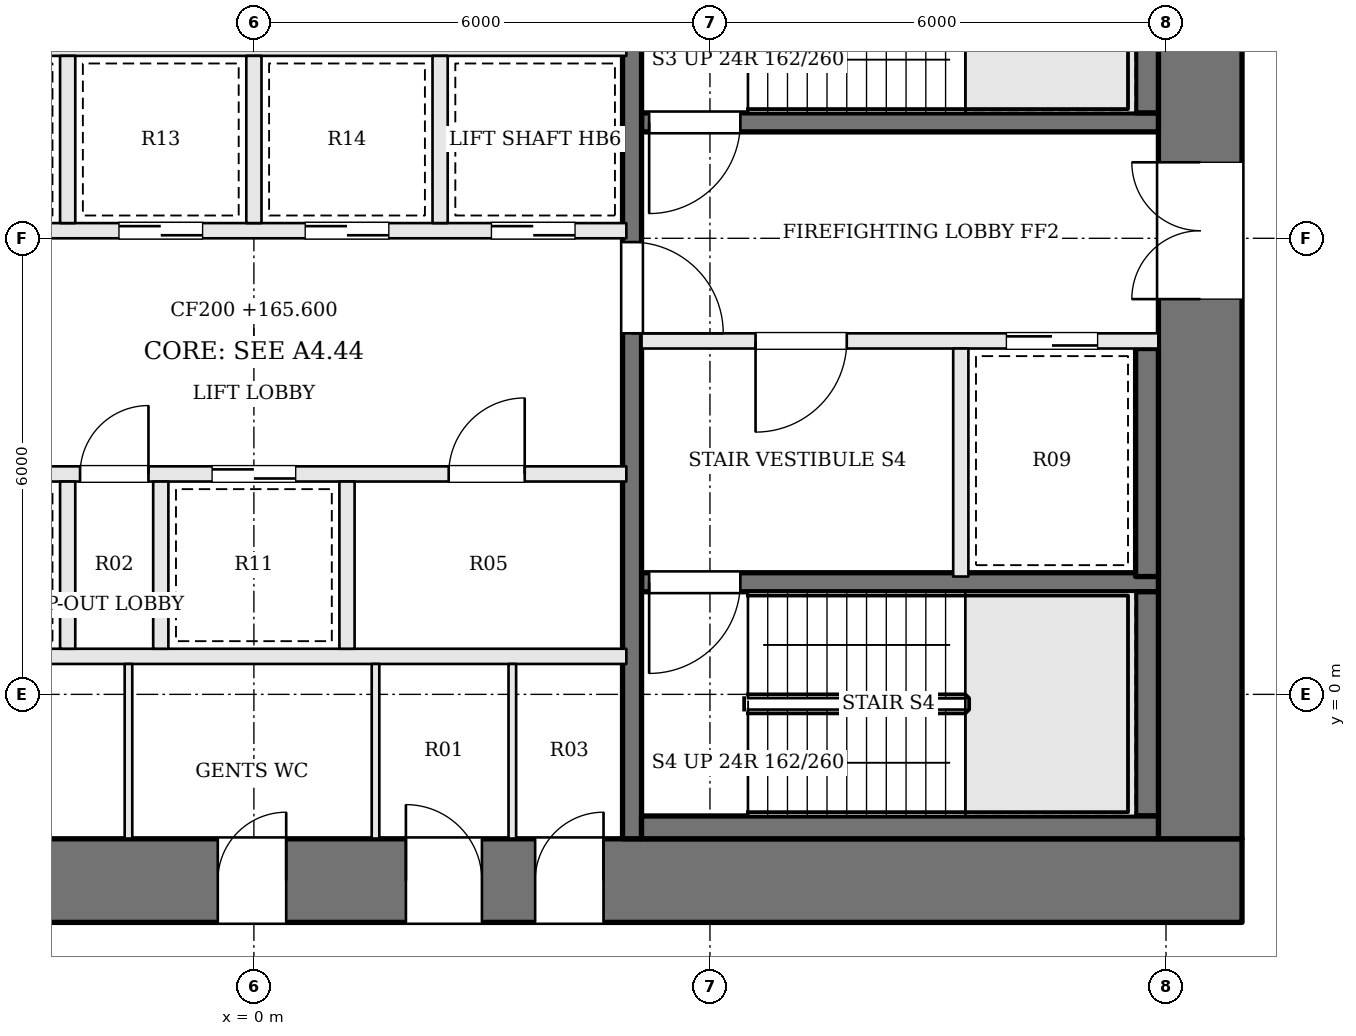
"""IFC4 building model, lengths in metres.
Left out: names, types, materials, properties, quantities, classifications, styles, units other than length and angle.
Written with IfcOpenShell. Run it as: python <this file> out.ifc"""

import sys

from ifc_helpers import new_model, si_unit, direction, frame, frame_2d, origin, place, context, subcontext, project, spatial, rectangle, extrude, element, fill, save


model = new_model("IFC4")
c1 = context("Model", 3, precision=1e-05, world=origin(), true_north=direction((0.0, 1.0)))
c2 = subcontext(c1, "Body", "Model", "MODEL_VIEW")
j1 = project(units=[si_unit("LENGTHUNIT", "METRE"), si_unit("PLANEANGLEUNIT", "RADIAN")], contexts=[c1])
p1 = place(None, origin())
s1 = spatial("IfcSite", under=j1, at=p1, CompositionType="ELEMENT")
p2 = place(p1, origin())
s2 = spatial("IfcBuilding", under=s1, at=p2, CompositionType="ELEMENT")
p3 = place(p2, frame((0.0, 0.0, 165.6)))
s3 = spatial("IfcBuildingStorey", under=s2, at=p3, CompositionType="ELEMENT", Elevation=165.6)
p4 = place(p3, frame((-13.0, -2.45, 0.0), z_axis=(0.0, 0.0, 1.0), x_axis=(1.0, 0.0, 0.0)))
e1 = element("IfcWall", 1, at=p4, inside=s3, PredefinedType="SHEAR", context=c2, shape_type="SweptSolid", body=[
    extrude(rectangle(XDim=26.0, YDim=1.1, at=frame_2d((13.0, 0.0))), origin(), (0.0, 0.0, 1.0), 3.9),
])
p5 = place(p4, frame((9.275, 0.0, 0.0)))
e2 = element("IfcOpeningElement", 2, at=p5, cuts=e1, PredefinedType="OPENING", context=c2, shape_type="SweptSolid", body=[
    extrude(rectangle(XDim=0.9, YDim=2.1, at=frame_2d((0.45, 1.05))), frame((0.0, 0.56, 0.0), z_axis=(0.0, -1.0, 0.0), x_axis=(1.0, 0.0, 0.0)), (0.0, 0.0, 1.0), 1.12),
])
p6 = place(p4, frame((12.525, 0.0, 0.0)))
e3 = element("IfcOpeningElement", 3, at=p6, cuts=e1, PredefinedType="OPENING", context=c2, shape_type="SweptSolid", body=[
    extrude(rectangle(XDim=0.9, YDim=2.1, at=frame_2d((0.45, 1.05))), frame((0.0, 0.56, 0.0), z_axis=(0.0, -1.0, 0.0), x_axis=(1.0, 0.0, 0.0)), (0.0, 0.0, 1.0), 1.12),
])
p7 = place(p4, frame((15.0, 0.0, 0.0)))
e4 = element("IfcOpeningElement", 4, at=p7, cuts=e1, PredefinedType="OPENING", context=c2, shape_type="SweptSolid", body=[
    extrude(rectangle(XDim=1.0, YDim=2.1, at=frame_2d((0.5, 1.05))), frame((0.0, 0.56, 0.0), z_axis=(0.0, -1.0, 0.0), x_axis=(1.0, 0.0, 0.0)), (0.0, 0.0, 1.0), 1.12),
])
p8 = place(p4, frame((16.7, 0.0, 0.0)))
e5 = element("IfcOpeningElement", 5, at=p8, cuts=e1, PredefinedType="OPENING", context=c2, shape_type="SweptSolid", body=[
    extrude(rectangle(XDim=0.9, YDim=2.1, at=frame_2d((0.45, 1.05))), frame((0.0, 0.56, 0.0), z_axis=(0.0, -1.0, 0.0), x_axis=(1.0, 0.0, 0.0)), (0.0, 0.0, 1.0), 1.12),
])
p9 = place(p3, frame((12.45, -1.9, 0.0), z_axis=(0.0, 0.0, 1.0), x_axis=(0.0, 1.0, 0.0)))
e6 = element("IfcWall", 6, at=p9, inside=s3, PredefinedType="SHEAR", context=c2, shape_type="SweptSolid", body=[
    extrude(rectangle(XDim=12.8, YDim=1.1, at=frame_2d((6.4, 0.0))), origin(), (0.0, 0.0, 1.0), 3.9),
])
p10 = place(p9, frame((7.1, 0.0, 0.0)))
e7 = element("IfcOpeningElement", 7, at=p10, cuts=e6, PredefinedType="OPENING", context=c2, shape_type="SweptSolid", body=[
    extrude(rectangle(XDim=1.8, YDim=2.1, at=frame_2d((0.9, 1.05))), frame((0.0, 0.56, 0.0), z_axis=(0.0, -1.0, 0.0), x_axis=(1.0, 0.0, 0.0)), (0.0, 0.0, 1.0), 1.12),
])
p11 = place(p3, frame((11.9, 7.525, 0.0), z_axis=(0.0, 0.0, 1.0), x_axis=(-1.0, 0.0, 0.0)))
e8 = element("IfcWall", 8, at=p11, inside=s3, PredefinedType="SOLIDWALL", context=c2, shape_type="SweptSolid", body=[
    extrude(rectangle(XDim=6.8, YDim=0.25, at=frame_2d((3.4, 0.0))), origin(), (0.0, 0.0, 1.0), 3.6),
])
p12 = place(p11, frame((5.5, 0.0, 0.0)))
e9 = element("IfcOpeningElement", 9, at=p12, cuts=e8, PredefinedType="OPENING", context=c2, shape_type="SweptSolid", body=[
    extrude(rectangle(XDim=1.2, YDim=2.1, at=frame_2d((0.6, 1.05))), frame((0.0, 0.135, 0.0), z_axis=(0.0, -1.0, 0.0), x_axis=(1.0, 0.0, 0.0)), (0.0, 0.0, 1.0), 0.27),
])
p13 = place(p3, frame((11.9, 4.65, 0.0), z_axis=(0.0, 0.0, 1.0), x_axis=(-1.0, 0.0, 0.0)))
e10 = element("IfcWall", 10, at=p13, inside=s3, PredefinedType="SOLIDWALL", context=c2, shape_type="SweptSolid", body=[
    extrude(rectangle(XDim=6.8, YDim=0.2, at=frame_2d((3.4, 0.0))), origin(), (0.0, 0.0, 1.0), 3.6),
])
p14 = place(p13, frame((4.1, 0.0, 0.0)))
e11 = element("IfcOpeningElement", 11, at=p14, cuts=e10, PredefinedType="OPENING", context=c2, shape_type="SweptSolid", body=[
    extrude(rectangle(XDim=1.2, YDim=2.1, at=frame_2d((0.6, 1.05))), frame((0.0, 0.11, 0.0), z_axis=(0.0, -1.0, 0.0), x_axis=(1.0, 0.0, 0.0)), (0.0, 0.0, 1.0), 0.22),
])
p15 = place(p13, frame((0.8, 0.0, 0.0)))
e12 = element("IfcOpeningElement", 12, at=p15, cuts=e10, PredefinedType="OPENING", context=c2, shape_type="SweptSolid", body=[
    extrude(rectangle(XDim=1.2, YDim=2.1, at=frame_2d((0.6, 1.05))), frame((0.0, 0.11, 0.0), z_axis=(0.0, -1.0, 0.0), x_axis=(1.0, 0.0, 0.0)), (0.0, 0.0, 1.0), 0.22),
])
p16 = place(p3, frame((11.9, 1.475, 0.0), z_axis=(0.0, 0.0, 1.0), x_axis=(-1.0, 0.0, 0.0)))
e13 = element("IfcWall", 13, at=p16, inside=s3, PredefinedType="SOLIDWALL", context=c2, shape_type="SweptSolid", body=[
    extrude(rectangle(XDim=6.8, YDim=0.25, at=frame_2d((3.4, 0.0))), origin(), (0.0, 0.0, 1.0), 3.6),
])
p17 = place(p16, frame((5.5, 0.0, 0.0)))
e14 = element("IfcOpeningElement", 14, at=p17, cuts=e13, PredefinedType="OPENING", context=c2, shape_type="SweptSolid", body=[
    extrude(rectangle(XDim=1.2, YDim=2.1, at=frame_2d((0.6, 1.05))), frame((0.0, 0.135, 0.0), z_axis=(0.0, -1.0, 0.0), x_axis=(1.0, 0.0, 0.0)), (0.0, 0.0, 1.0), 0.27),
])
p18 = place(p3, frame((9.3, 4.55, 0.0), z_axis=(0.0, 0.0, 1.0), x_axis=(0.0, -1.0, 0.0)))
e15 = element("IfcWall", 15, at=p18, inside=s3, PredefinedType="SOLIDWALL", context=c2, shape_type="SweptSolid", body=[
    extrude(rectangle(XDim=3.0, YDim=0.2, at=frame_2d((1.5, 0.0))), origin(), (0.0, 0.0, 1.0), 3.6),
])
p19 = place(p3, frame((4.975, 10.9, 0.0), z_axis=(0.0, 0.0, 1.0), x_axis=(0.0, -1.0, 0.0)))
e16 = element("IfcWall", 16, at=p19, inside=s3, PredefinedType="SOLIDWALL", context=c2, shape_type="SweptSolid", body=[
    extrude(rectangle(XDim=12.8, YDim=0.25, at=frame_2d((6.4, 0.0))), origin(), (0.0, 0.0, 1.0), 3.6),
])
p20 = place(p19, frame((4.95, 0.0, 0.0)))
e17 = element("IfcOpeningElement", 17, at=p20, cuts=e16, PredefinedType="OPENING", context=c2, shape_type="SweptSolid", body=[
    extrude(rectangle(XDim=1.2, YDim=2.1, at=frame_2d((0.6, 1.05))), frame((0.0, 0.135, 0.0), z_axis=(0.0, -1.0, 0.0), x_axis=(1.0, 0.0, 0.0)), (0.0, 0.0, 1.0), 0.27),
])
p21 = place(p3, frame((11.75, 10.6, 0.0), z_axis=(0.0, 0.0, 1.0), x_axis=(0.0, -1.0, 0.0)))
e18 = element("IfcWall", 18, at=p21, inside=s3, PredefinedType="SOLIDWALL", context=c2, shape_type="SweptSolid", body=[
    extrude(rectangle(XDim=2.95, YDim=0.3, at=frame_2d((1.475, 0.0))), origin(), (0.0, 0.0, 1.0), 3.6),
])
p22 = place(p3, frame((11.75, 4.55, 0.0), z_axis=(0.0, 0.0, 1.0), x_axis=(0.0, -1.0, 0.0)))
e19 = element("IfcWall", 19, at=p22, inside=s3, PredefinedType="SOLIDWALL", context=c2, shape_type="SweptSolid", body=[
    extrude(rectangle(XDim=3.0, YDim=0.3, at=frame_2d((1.5, 0.0))), origin(), (0.0, 0.0, 1.0), 3.6),
])
p23 = place(p3, frame((11.75, 1.35, 0.0), z_axis=(0.0, 0.0, 1.0), x_axis=(0.0, -1.0, 0.0)))
e20 = element("IfcWall", 20, at=p23, inside=s3, PredefinedType="SOLIDWALL", context=c2, shape_type="SweptSolid", body=[
    extrude(rectangle(XDim=2.95, YDim=0.3, at=frame_2d((1.475, 0.0))), origin(), (0.0, 0.0, 1.0), 3.6),
])
p24 = place(p3, frame((11.9, -1.75, 0.0), z_axis=(0.0, 0.0, 1.0), x_axis=(-1.0, 0.0, 0.0)))
e21 = element("IfcWall", 21, at=p24, inside=s3, PredefinedType="SOLIDWALL", context=c2, shape_type="SweptSolid", body=[
    extrude(rectangle(XDim=6.8, YDim=0.3, at=frame_2d((3.4, 0.0))), origin(), (0.0, 0.0, 1.0), 3.6),
])
p25 = place(p3, frame((-4.9, 0.5, 0.0), z_axis=(0.0, 0.0, 1.0), x_axis=(1.0, 0.0, 0.0)))
e22 = element("IfcWall", 22, at=p25, inside=s3, PredefinedType="SOLIDWALL", context=c2, shape_type="SweptSolid", body=[
    extrude(rectangle(XDim=9.8, YDim=0.2, at=frame_2d((4.9, 0.0))), origin(), (0.0, 0.0, 1.0), 3.6),
])
p26 = place(p3, frame((-4.9, 2.9, 0.0), z_axis=(0.0, 0.0, 1.0), x_axis=(1.0, 0.0, 0.0)))
e23 = element("IfcWall", 23, at=p26, inside=s3, PredefinedType="SOLIDWALL", context=c2, shape_type="SweptSolid", body=[
    extrude(rectangle(XDim=9.8, YDim=0.2, at=frame_2d((4.9, 0.0))), origin(), (0.0, 0.0, 1.0), 3.6),
])
p27 = place(p26, frame((0.675, 0.0, 0.0)))
e24 = element("IfcOpeningElement", 24, at=p27, cuts=e23, PredefinedType="OPENING", context=c2, shape_type="SweptSolid", body=[
    extrude(rectangle(XDim=1.1, YDim=2.1, at=frame_2d((0.55, 1.05))), frame((0.0, 0.11, 0.0), z_axis=(0.0, -1.0, 0.0), x_axis=(1.0, 0.0, 0.0)), (0.0, 0.0, 1.0), 0.22),
])
p28 = place(p26, frame((2.613, 0.0, 0.0)))
e25 = element("IfcOpeningElement", 25, at=p28, cuts=e23, PredefinedType="OPENING", context=c2, shape_type="SweptSolid", body=[
    extrude(rectangle(XDim=0.9, YDim=2.1, at=frame_2d((0.45, 1.05))), frame((0.0, 0.11, 0.0), z_axis=(0.0, -1.0, 0.0), x_axis=(1.0, 0.0, 0.0)), (0.0, 0.0, 1.0), 0.22),
])
p29 = place(p26, frame((4.35, 0.0, 0.0)))
e26 = element("IfcOpeningElement", 26, at=p29, cuts=e23, PredefinedType="OPENING", context=c2, shape_type="SweptSolid", body=[
    extrude(rectangle(XDim=1.1, YDim=2.1, at=frame_2d((0.55, 1.05))), frame((0.0, 0.11, 0.0), z_axis=(0.0, -1.0, 0.0), x_axis=(1.0, 0.0, 0.0)), (0.0, 0.0, 1.0), 0.22),
])
p30 = place(p26, frame((7.463, 0.0, 0.0)))
e27 = element("IfcOpeningElement", 27, at=p30, cuts=e23, PredefinedType="OPENING", context=c2, shape_type="SweptSolid", body=[
    extrude(rectangle(XDim=1.0, YDim=2.1, at=frame_2d((0.5, 1.05))), frame((0.0, 0.11, 0.0), z_axis=(0.0, -1.0, 0.0), x_axis=(1.0, 0.0, 0.0)), (0.0, 0.0, 1.0), 0.22),
])
p31 = place(p3, frame((-4.9, 6.1, 0.0), z_axis=(0.0, 0.0, 1.0), x_axis=(1.0, 0.0, 0.0)))
e28 = element("IfcWall", 28, at=p31, inside=s3, PredefinedType="SOLIDWALL", context=c2, shape_type="SweptSolid", body=[
    extrude(rectangle(XDim=9.8, YDim=0.2, at=frame_2d((4.9, 0.0))), origin(), (0.0, 0.0, 1.0), 3.6),
])
p32 = place(p31, frame((0.675, 0.0, 0.0)))
e29 = element("IfcOpeningElement", 29, at=p32, cuts=e28, PredefinedType="OPENING", context=c2, shape_type="SweptSolid", body=[
    extrude(rectangle(XDim=1.1, YDim=2.1, at=frame_2d((0.55, 1.05))), frame((0.0, 0.11, 0.0), z_axis=(0.0, -1.0, 0.0), x_axis=(1.0, 0.0, 0.0)), (0.0, 0.0, 1.0), 0.22),
])
p33 = place(p31, frame((3.125, 0.0, 0.0)))
e30 = element("IfcOpeningElement", 30, at=p33, cuts=e28, PredefinedType="OPENING", context=c2, shape_type="SweptSolid", body=[
    extrude(rectangle(XDim=1.1, YDim=2.1, at=frame_2d((0.55, 1.05))), frame((0.0, 0.11, 0.0), z_axis=(0.0, -1.0, 0.0), x_axis=(1.0, 0.0, 0.0)), (0.0, 0.0, 1.0), 0.22),
])
p34 = place(p31, frame((5.575, 0.0, 0.0)))
e31 = element("IfcOpeningElement", 31, at=p34, cuts=e28, PredefinedType="OPENING", context=c2, shape_type="SweptSolid", body=[
    extrude(rectangle(XDim=1.1, YDim=2.1, at=frame_2d((0.55, 1.05))), frame((0.0, 0.11, 0.0), z_axis=(0.0, -1.0, 0.0), x_axis=(1.0, 0.0, 0.0)), (0.0, 0.0, 1.0), 0.22),
])
p35 = place(p31, frame((8.025, 0.0, 0.0)))
e32 = element("IfcOpeningElement", 32, at=p35, cuts=e28, PredefinedType="OPENING", context=c2, shape_type="SweptSolid", body=[
    extrude(rectangle(XDim=1.1, YDim=2.1, at=frame_2d((0.55, 1.05))), frame((0.0, 0.11, 0.0), z_axis=(0.0, -1.0, 0.0), x_axis=(1.0, 0.0, 0.0)), (0.0, 0.0, 1.0), 0.22),
])
p36 = place(p3, frame((-4.9, 8.5, 0.0), z_axis=(0.0, 0.0, 1.0), x_axis=(1.0, 0.0, 0.0)))
e33 = element("IfcWall", 33, at=p36, inside=s3, PredefinedType="SOLIDWALL", context=c2, shape_type="SweptSolid", body=[
    extrude(rectangle(XDim=9.8, YDim=0.2, at=frame_2d((4.9, 0.0))), origin(), (0.0, 0.0, 1.0), 3.6),
])
for number, where, z_axis, x_axis in (
    (34, (-2.45, 0.6, 0.0), (0.0, 0.0, 1.0), (0.0, 1.0, 0.0)),
    (35, (-1.225, 0.6, 0.0), (0.0, 0.0, 1.0), (0.0, 1.0, 0.0)),
    (36, (1.225, 0.6, 0.0), (0.0, 0.0, 1.0), (0.0, 1.0, 0.0)),
    (37, (-2.45, 6.2, 0.0), (0.0, 0.0, 1.0), (0.0, 1.0, 0.0)),
    (38, (0.0, 6.2, 0.0), (0.0, 0.0, 1.0), (0.0, 1.0, 0.0)),
    (39, (2.45, 6.2, 0.0), (0.0, 0.0, 1.0), (0.0, 1.0, 0.0)),
):
    element("IfcWall", number, at=place(p3, frame(where, z_axis=z_axis, x_axis=x_axis)), inside=s3, PredefinedType="SOLIDWALL", context=c2, shape_type="SweptSolid", body=[
        extrude(rectangle(XDim=2.2, YDim=0.2, at=frame_2d((1.1, 0.0))), origin(), (0.0, 0.0, 1.0), 3.6),
    ])
for number, where, z_axis, x_axis in (
    (40, (-1.65, -1.9, 0.0), (0.0, 0.0, 1.0), (0.0, 1.0, 0.0)),
    (41, (1.6, -1.9, 0.0), (0.0, 0.0, 1.0), (0.0, 1.0, 0.0)),
    (42, (3.4, -1.9, 0.0), (0.0, 0.0, 1.0), (0.0, 1.0, 0.0)),
):
    element("IfcWall", number, at=place(p3, frame(where, z_axis=z_axis, x_axis=x_axis)), inside=s3, PredefinedType="PARTITIONING", context=c2, shape_type="SweptSolid", body=[
        extrude(rectangle(XDim=2.3, YDim=0.1, at=frame_2d((1.15, 0.0))), origin(), (0.0, 0.0, 1.0), 3.6),
    ])
p37 = place(p10, origin())
e43 = element("IfcDoor", 43, at=p37, inside=s3, OperationType="DOUBLE_DOOR_SINGLE_SWING", PredefinedType="DOOR", context=c2, shape_type="SweptSolid", body=[
    extrude(rectangle(XDim=1.8, YDim=2.1, at=frame_2d((0.9, 1.05))), frame((0.0, 0.025, 0.0), z_axis=(0.0, -1.0, 0.0), x_axis=(1.0, 0.0, 0.0)), (0.0, 0.0, 1.0), 0.05),
])
fill(e7, e43)
p38 = place(p20, origin())
e44 = element("IfcDoor", 44, at=p38, inside=s3, OperationType="SINGLE_SWING_RIGHT", PredefinedType="DOOR", context=c2, shape_type="SweptSolid", body=[
    extrude(rectangle(XDim=1.2, YDim=2.1, at=frame_2d((0.6, 1.05))), frame((0.0, 0.025, 0.0), z_axis=(0.0, -1.0, 0.0), x_axis=(1.0, 0.0, 0.0)), (0.0, 0.0, 1.0), 0.05),
])
fill(e17, e44)
p39 = place(p14, origin())
e45 = element("IfcDoor", 45, at=p39, inside=s3, OperationType="SINGLE_SWING_RIGHT", PredefinedType="DOOR", context=c2, shape_type="SweptSolid", body=[
    extrude(rectangle(XDim=1.2, YDim=2.1, at=frame_2d((0.6, 1.05))), frame((0.0, 0.025, 0.0), z_axis=(0.0, -1.0, 0.0), x_axis=(1.0, 0.0, 0.0)), (0.0, 0.0, 1.0), 0.05),
])
fill(e11, e45)
p40 = place(p12, origin())
e46 = element("IfcDoor", 46, at=p40, inside=s3, OperationType="SINGLE_SWING_RIGHT", PredefinedType="DOOR", context=c2, shape_type="SweptSolid", body=[
    extrude(rectangle(XDim=1.2, YDim=2.1, at=frame_2d((0.6, 1.05))), frame((0.0, 0.025, 0.0), z_axis=(0.0, -1.0, 0.0), x_axis=(1.0, 0.0, 0.0)), (0.0, 0.0, 1.0), 0.05),
])
fill(e9, e46)
p41 = place(p17, origin())
e47 = element("IfcDoor", 47, at=p41, inside=s3, OperationType="SINGLE_SWING_RIGHT", PredefinedType="DOOR", context=c2, shape_type="SweptSolid", body=[
    extrude(rectangle(XDim=1.2, YDim=2.1, at=frame_2d((0.6, 1.05))), frame((0.0, 0.025, 0.0), z_axis=(0.0, -1.0, 0.0), x_axis=(1.0, 0.0, 0.0)), (0.0, 0.0, 1.0), 0.05),
])
fill(e14, e47)
p42 = place(p15, origin())
e48 = element("IfcDoor", 48, at=p42, inside=s3, OperationType="SLIDING_TO_RIGHT", PredefinedType="DOOR", context=c2, shape_type="SweptSolid", body=[
    extrude(rectangle(XDim=1.2, YDim=2.1, at=frame_2d((0.6, 1.05))), frame((0.0, 0.025, 0.0), z_axis=(0.0, -1.0, 0.0), x_axis=(1.0, 0.0, 0.0)), (0.0, 0.0, 1.0), 0.05),
])
fill(e12, e48)
p43 = place(p28, origin())
e49 = element("IfcDoor", 49, at=p43, inside=s3, OperationType="SINGLE_SWING_RIGHT", PredefinedType="DOOR", context=c2, shape_type="SweptSolid", body=[
    extrude(rectangle(XDim=0.9, YDim=2.1, at=frame_2d((0.45, 1.05))), frame((0.0, 0.025, 0.0), z_axis=(0.0, -1.0, 0.0), x_axis=(1.0, 0.0, 0.0)), (0.0, 0.0, 1.0), 0.05),
])
fill(e25, e49)
p44 = place(p29, origin())
e50 = element("IfcDoor", 50, at=p44, inside=s3, OperationType="SLIDING_TO_LEFT", PredefinedType="DOOR", context=c2, shape_type="SweptSolid", body=[
    extrude(rectangle(XDim=1.1, YDim=2.1, at=frame_2d((0.55, 1.05))), frame((0.0, 0.025, 0.0), z_axis=(0.0, -1.0, 0.0), x_axis=(1.0, 0.0, 0.0)), (0.0, 0.0, 1.0), 0.05),
])
fill(e26, e50)
p45 = place(p30, origin())
e51 = element("IfcDoor", 51, at=p45, inside=s3, OperationType="SINGLE_SWING_RIGHT", PredefinedType="DOOR", context=c2, shape_type="SweptSolid", body=[
    extrude(rectangle(XDim=1.0, YDim=2.1, at=frame_2d((0.5, 1.05))), frame((0.0, 0.025, 0.0), z_axis=(0.0, -1.0, 0.0), x_axis=(1.0, 0.0, 0.0)), (0.0, 0.0, 1.0), 0.05),
])
fill(e27, e51)
p46 = place(p33, origin())
e52 = element("IfcDoor", 52, at=p46, inside=s3, OperationType="SLIDING_TO_LEFT", PredefinedType="DOOR", context=c2, shape_type="SweptSolid", body=[
    extrude(rectangle(XDim=1.1, YDim=2.1, at=frame_2d((0.55, 1.05))), frame((0.0, 0.025, 0.0), z_axis=(0.0, -1.0, 0.0), x_axis=(1.0, 0.0, 0.0)), (0.0, 0.0, 1.0), 0.05),
])
fill(e30, e52)
p47 = place(p34, origin())
e53 = element("IfcDoor", 53, at=p47, inside=s3, OperationType="SLIDING_TO_RIGHT", PredefinedType="DOOR", context=c2, shape_type="SweptSolid", body=[
    extrude(rectangle(XDim=1.1, YDim=2.1, at=frame_2d((0.55, 1.05))), frame((0.0, 0.025, 0.0), z_axis=(0.0, -1.0, 0.0), x_axis=(1.0, 0.0, 0.0)), (0.0, 0.0, 1.0), 0.05),
])
fill(e31, e53)
p48 = place(p35, origin())
e54 = element("IfcDoor", 54, at=p48, inside=s3, OperationType="SLIDING_TO_LEFT", PredefinedType="DOOR", context=c2, shape_type="SweptSolid", body=[
    extrude(rectangle(XDim=1.1, YDim=2.1, at=frame_2d((0.55, 1.05))), frame((0.0, 0.025, 0.0), z_axis=(0.0, -1.0, 0.0), x_axis=(1.0, 0.0, 0.0)), (0.0, 0.0, 1.0), 0.05),
])
fill(e32, e54)
p49 = place(p6, origin())
e55 = element("IfcDoor", 55, at=p49, inside=s3, OperationType="SINGLE_SWING_RIGHT", PredefinedType="DOOR", context=c2, shape_type="SweptSolid", body=[
    extrude(rectangle(XDim=0.9, YDim=2.1, at=frame_2d((0.45, 1.05))), frame((0.0, 0.025, 0.0), z_axis=(0.0, -1.0, 0.0), x_axis=(1.0, 0.0, 0.0)), (0.0, 0.0, 1.0), 0.05),
])
fill(e3, e55)
p50 = place(p7, origin())
e56 = element("IfcDoor", 56, at=p50, inside=s3, OperationType="SINGLE_SWING_LEFT", PredefinedType="DOOR", context=c2, shape_type="SweptSolid", body=[
    extrude(rectangle(XDim=1.0, YDim=2.1, at=frame_2d((0.5, 1.05))), frame((0.0, 0.025, 0.0), z_axis=(0.0, -1.0, 0.0), x_axis=(1.0, 0.0, 0.0)), (0.0, 0.0, 1.0), 0.05),
])
fill(e4, e56)
p51 = place(p8, origin())
e57 = element("IfcDoor", 57, at=p51, inside=s3, OperationType="SINGLE_SWING_RIGHT", PredefinedType="DOOR", context=c2, shape_type="SweptSolid", body=[
    extrude(rectangle(XDim=0.9, YDim=2.1, at=frame_2d((0.45, 1.05))), frame((0.0, 0.025, 0.0), z_axis=(0.0, -1.0, 0.0), x_axis=(1.0, 0.0, 0.0)), (0.0, 0.0, 1.0), 0.05),
])
fill(e5, e57)
save(model, sys.argv[1])
